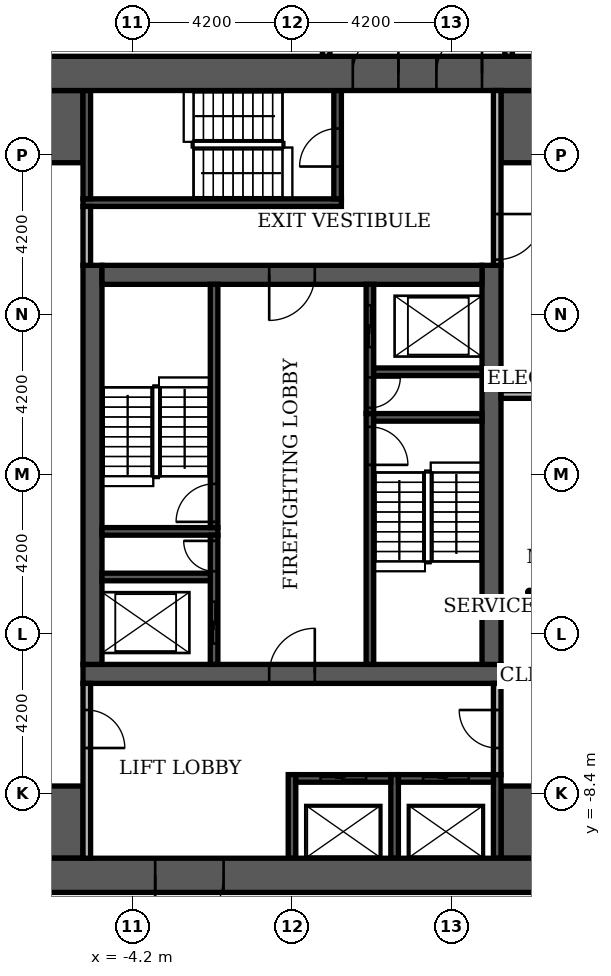
"""IFC4 building model, lengths in metres.
Left out: names, types, materials, properties, quantities, classifications, styles, units other than length and angle.
Written with IfcOpenShell. Run it as: python <this file> out.ifc"""

import sys

from ifc_helpers import new_model, si_unit, direction, frame, frame_2d, origin, place, context, subcontext, project, spatial, rectangle, extrude, element, fill, save


model = new_model("IFC4")
c1 = context("Model", 3, precision=1e-05, world=origin(), true_north=direction((0.0, 1.0)))
c2 = subcontext(c1, "Body", "Model", "MODEL_VIEW")
j1 = project(units=[si_unit("LENGTHUNIT", "METRE"), si_unit("PLANEANGLEUNIT", "RADIAN")], contexts=[c1])
p1 = place(None, origin())
s1 = spatial("IfcSite", under=j1, at=p1, CompositionType="ELEMENT")
p2 = place(p1, origin())
s2 = spatial("IfcBuilding", under=s1, at=p2, CompositionType="ELEMENT")
p3 = place(p2, origin())
s3 = spatial("IfcBuildingStorey", under=s2, at=p3, CompositionType="ELEMENT", Elevation=0.0)
p4 = place(p3, frame((-5.5, -5.25, 0.0), z_axis=(0.0, 0.0, 1.0), x_axis=(1.0, 0.0, 0.0)))
e1 = element("IfcWall", 1, at=p4, inside=s3, PredefinedType="SHEAR", context=c2, shape_type="SweptSolid", body=[
    extrude(rectangle(XDim=11.0, YDim=0.5, at=frame_2d((5.5, 0.0))), origin(), (0.0, 0.0, 1.0), 6.78),
])
p5 = place(p4, frame((4.9, 0.0, 0.0)))
e2 = element("IfcOpeningElement", 2, at=p5, cuts=e1, PredefinedType="OPENING", context=c2, shape_type="SweptSolid", body=[
    extrude(rectangle(XDim=1.2, YDim=2.1, at=frame_2d((0.6, 1.05))), frame((0.0, 0.26, 0.0), z_axis=(0.0, -1.0, 0.0), x_axis=(1.0, 0.0, 0.0)), (0.0, 0.0, 1.0), 0.52),
])
for number, where, z_axis, x_axis in (
    (3, (-5.25, -5.0, 0.0), (0.0, 0.0, 1.0), (0.0, 1.0, 0.0)),
    (4, (5.25, -5.0, 0.0), (0.0, 0.0, 1.0), (0.0, 1.0, 0.0)),
):
    element("IfcWall", number, at=place(p3, frame(where, z_axis=z_axis, x_axis=x_axis)), inside=s3, PredefinedType="SHEAR", context=c2, shape_type="SweptSolid", body=[
        extrude(rectangle(XDim=10.5, YDim=0.5, at=frame_2d((5.25, 0.0))), origin(), (0.0, 0.0, 1.0), 6.78),
    ])
p6 = place(p3, frame((-5.0, 5.25, 0.0), z_axis=(0.0, 0.0, 1.0), x_axis=(1.0, 0.0, 0.0)))
e5 = element("IfcWall", 5, at=p6, inside=s3, PredefinedType="SHEAR", context=c2, shape_type="SweptSolid", body=[
    extrude(rectangle(XDim=10.0, YDim=0.5, at=frame_2d((5.0, 0.0))), origin(), (0.0, 0.0, 1.0), 6.78),
])
p7 = place(p6, frame((4.4, 0.0, 0.0)))
e6 = element("IfcOpeningElement", 6, at=p7, cuts=e5, PredefinedType="OPENING", context=c2, shape_type="SweptSolid", body=[
    extrude(rectangle(XDim=1.2, YDim=2.1, at=frame_2d((0.6, 1.05))), frame((0.0, 0.26, 0.0), z_axis=(0.0, -1.0, 0.0), x_axis=(1.0, 0.0, 0.0)), (0.0, 0.0, 1.0), 0.52),
])
for number, where, z_axis, x_axis in (
    (7, (-10.1, -9.15, 0.0), (0.0, 0.0, 1.0), (1.0, 0.0, 0.0)),
    (8, (5.5, -9.15, 0.0), (0.0, 0.0, 1.0), (1.0, 0.0, 0.0)),
    (9, (-10.1, 9.15, 0.0), (0.0, 0.0, 1.0), (1.0, 0.0, 0.0)),
    (10, (5.5, 9.15, 0.0), (0.0, 0.0, 1.0), (1.0, 0.0, 0.0)),
):
    element("IfcWall", number, at=place(p3, frame(where, z_axis=z_axis, x_axis=x_axis)), inside=s3, PredefinedType="SHEAR", context=c2, shape_type="SweptSolid", body=[
        extrude(rectangle(XDim=4.6, YDim=1.9, at=frame_2d((2.3, 0.0))), origin(), (0.0, 0.0, 1.0), 6.78),
    ])
p8 = place(p3, frame((2.05, -5.0, 0.0), z_axis=(0.0, 0.0, 1.0), x_axis=(0.0, 1.0, 0.0)))
e11 = element("IfcWall", 11, at=p8, inside=s3, PredefinedType="SHEAR", context=c2, shape_type="SweptSolid", body=[
    extrude(rectangle(XDim=6.6, YDim=0.2, at=frame_2d((3.3, 0.0))), origin(), (0.0, 0.0, 1.0), 6.78),
])
p9 = place(p8, frame((5.25, 0.0, 0.0)))
e12 = element("IfcOpeningElement", 12, at=p9, cuts=e11, PredefinedType="OPENING", context=c2, shape_type="SweptSolid", body=[
    extrude(rectangle(XDim=1.0, YDim=2.1, at=frame_2d((0.5, 1.05))), frame((0.0, 0.11, 0.0), z_axis=(0.0, -1.0, 0.0), x_axis=(1.0, 0.0, 0.0)), (0.0, 0.0, 1.0), 0.22),
])
p10 = place(p3, frame((-5.0, -1.5, 0.0), z_axis=(0.0, 0.0, 1.0), x_axis=(1.0, 0.0, 0.0)))
e13 = element("IfcWall", 13, at=p10, inside=s3, PredefinedType="SHEAR", context=c2, shape_type="SweptSolid", body=[
    extrude(rectangle(XDim=3.05, YDim=0.2, at=frame_2d((1.525, 0.0))), origin(), (0.0, 0.0, 1.0), 6.78),
])
p11 = place(p3, frame((-2.05, -1.4, 0.0), z_axis=(0.0, 0.0, 1.0), x_axis=(0.0, 1.0, 0.0)))
e14 = element("IfcWall", 14, at=p11, inside=s3, PredefinedType="SHEAR", context=c2, shape_type="SweptSolid", body=[
    extrude(rectangle(XDim=6.4, YDim=0.2, at=frame_2d((3.2, 0.0))), origin(), (0.0, 0.0, 1.0), 6.78),
])
p12 = place(p11, frame((0.15, 0.0, 0.0)))
e15 = element("IfcOpeningElement", 15, at=p12, cuts=e14, PredefinedType="OPENING", context=c2, shape_type="SweptSolid", body=[
    extrude(rectangle(XDim=1.0, YDim=2.1, at=frame_2d((0.5, 1.05))), frame((0.0, 0.11, 0.0), z_axis=(0.0, -1.0, 0.0), x_axis=(1.0, 0.0, 0.0)), (0.0, 0.0, 1.0), 0.22),
])
p13 = place(p3, frame((2.15, 1.5, 0.0), z_axis=(0.0, 0.0, 1.0), x_axis=(1.0, 0.0, 0.0)))
e16 = element("IfcWall", 16, at=p13, inside=s3, PredefinedType="SHEAR", context=c2, shape_type="SweptSolid", body=[
    extrude(rectangle(XDim=2.85, YDim=0.2, at=frame_2d((1.425, 0.0))), origin(), (0.0, 0.0, 1.0), 6.78),
])
p14 = place(p3, frame((-5.5, 7.15, 0.0), z_axis=(0.0, 0.0, 1.0), x_axis=(1.0, 0.0, 0.0)))
e17 = element("IfcWall", 17, at=p14, inside=s3, PredefinedType="SHEAR", context=c2, shape_type="SweptSolid", body=[
    extrude(rectangle(XDim=6.8, YDim=0.2, at=frame_2d((3.4, 0.0))), origin(), (0.0, 0.0, 1.0), 6.78),
])
p15 = place(p3, frame((-5.4, 7.25, 0.0), z_axis=(0.0, 0.0, 1.0), x_axis=(0.0, 1.0, 0.0)))
e18 = element("IfcWall", 18, at=p15, inside=s3, PredefinedType="SHEAR", context=c2, shape_type="SweptSolid", body=[
    extrude(rectangle(XDim=2.85, YDim=0.2, at=frame_2d((1.425, 0.0))), origin(), (0.0, 0.0, 1.0), 6.78),
])
p16 = place(p3, frame((1.2, 7.25, 0.0), z_axis=(0.0, 0.0, 1.0), x_axis=(0.0, 1.0, 0.0)))
e19 = element("IfcWall", 19, at=p16, inside=s3, PredefinedType="SHEAR", context=c2, shape_type="SweptSolid", body=[
    extrude(rectangle(XDim=2.85, YDim=0.2, at=frame_2d((1.425, 0.0))), origin(), (0.0, 0.0, 1.0), 6.78),
])
p17 = place(p16, frame((0.85, 0.0, 0.0)))
e20 = element("IfcOpeningElement", 20, at=p17, cuts=e19, PredefinedType="OPENING", context=c2, shape_type="SweptSolid", body=[
    extrude(rectangle(XDim=1.0, YDim=2.1, at=frame_2d((0.5, 1.05))), frame((0.0, 0.11, 0.0), z_axis=(0.0, -1.0, 0.0), x_axis=(1.0, 0.0, 0.0)), (0.0, 0.0, 1.0), 0.22),
])
for number, where, z_axis, x_axis in (
    (21, (0.0, -10.1, 0.0), (0.0, 0.0, 1.0), (0.0, 1.0, 0.0)),
    (22, (2.7, -10.1, 0.0), (0.0, 0.0, 1.0), (0.0, 1.0, 0.0)),
    (23, (5.4, -10.1, 0.0), (0.0, 0.0, 1.0), (0.0, 1.0, 0.0)),
):
    element("IfcWall", number, at=place(p3, frame(where, z_axis=z_axis, x_axis=x_axis)), inside=s3, PredefinedType="SHEAR", context=c2, shape_type="SweptSolid", body=[
        extrude(rectangle(XDim=2.2, YDim=0.2, at=frame_2d((1.1, 0.0))), origin(), (0.0, 0.0, 1.0), 6.78),
    ])
p18 = place(p3, frame((0.1, -8.0, 0.0), z_axis=(0.0, 0.0, 1.0), x_axis=(1.0, 0.0, 0.0)))
e24 = element("IfcWall", 24, at=p18, inside=s3, PredefinedType="SHEAR", context=c2, shape_type="SweptSolid", body=[
    extrude(rectangle(XDim=2.5, YDim=0.2, at=frame_2d((1.25, 0.0))), origin(), (0.0, 0.0, 1.0), 6.78),
])
p19 = place(p18, frame((0.65, 0.0, 0.0)))
e25 = element("IfcOpeningElement", 25, at=p19, cuts=e24, PredefinedType="OPENING", context=c2, shape_type="SweptSolid", body=[
    extrude(rectangle(XDim=1.2, YDim=2.1, at=frame_2d((0.6, 1.05))), frame((0.0, 0.11, 0.0), z_axis=(0.0, -1.0, 0.0), x_axis=(1.0, 0.0, 0.0)), (0.0, 0.0, 1.0), 0.22),
])
p20 = place(p3, frame((2.8, -8.0, 0.0), z_axis=(0.0, 0.0, 1.0), x_axis=(1.0, 0.0, 0.0)))
e26 = element("IfcWall", 26, at=p20, inside=s3, PredefinedType="SHEAR", context=c2, shape_type="SweptSolid", body=[
    extrude(rectangle(XDim=2.5, YDim=0.2, at=frame_2d((1.25, 0.0))), origin(), (0.0, 0.0, 1.0), 6.78),
])
p21 = place(p20, frame((0.65, 0.0, 0.0)))
e27 = element("IfcOpeningElement", 27, at=p21, cuts=e26, PredefinedType="OPENING", context=c2, shape_type="SweptSolid", body=[
    extrude(rectangle(XDim=1.2, YDim=2.1, at=frame_2d((0.6, 1.05))), frame((0.0, 0.11, 0.0), z_axis=(0.0, -1.0, 0.0), x_axis=(1.0, 0.0, 0.0)), (0.0, 0.0, 1.0), 0.22),
])
p22 = place(p3, frame((-2.05, -5.0, 0.0), z_axis=(0.0, 0.0, 1.0), x_axis=(0.0, 1.0, 0.0)))
e28 = element("IfcWall", 28, at=p22, inside=s3, PredefinedType="SHEAR", context=c2, shape_type="SweptSolid", body=[
    extrude(rectangle(XDim=3.4, YDim=0.2, at=frame_2d((1.7, 0.0))), origin(), (0.0, 0.0, 1.0), 6.78),
])
p23 = place(p22, frame((0.55, 0.0, 0.0)))
e29 = element("IfcOpeningElement", 29, at=p23, cuts=e28, PredefinedType="OPENING", context=c2, shape_type="SweptSolid", body=[
    extrude(rectangle(XDim=1.1, YDim=2.1, at=frame_2d((0.55, 1.05))), frame((0.0, 0.11, 0.0), z_axis=(0.0, -1.0, 0.0), x_axis=(1.0, 0.0, 0.0)), (0.0, 0.0, 1.0), 0.22),
])
p24 = place(p22, frame((2.45, 0.0, 0.0)))
e30 = element("IfcOpeningElement", 30, at=p24, cuts=e28, PredefinedType="OPENING", context=c2, shape_type="SweptSolid", body=[
    extrude(rectangle(XDim=0.8, YDim=2.1, at=frame_2d((0.4, 1.05))), frame((0.0, 0.11, 0.0), z_axis=(0.0, -1.0, 0.0), x_axis=(1.0, 0.0, 0.0)), (0.0, 0.0, 1.0), 0.22),
])
p25 = place(p3, frame((-5.0, -2.7, 0.0), z_axis=(0.0, 0.0, 1.0), x_axis=(1.0, 0.0, 0.0)))
e31 = element("IfcWall", 31, at=p25, inside=s3, PredefinedType="SHEAR", context=c2, shape_type="SweptSolid", body=[
    extrude(rectangle(XDim=2.85, YDim=0.2, at=frame_2d((1.425, 0.0))), origin(), (0.0, 0.0, 1.0), 6.78),
])
p26 = place(p3, frame((2.05, 1.6, 0.0), z_axis=(0.0, 0.0, 1.0), x_axis=(0.0, 1.0, 0.0)))
e32 = element("IfcWall", 32, at=p26, inside=s3, PredefinedType="SHEAR", context=c2, shape_type="SweptSolid", body=[
    extrude(rectangle(XDim=3.4, YDim=0.2, at=frame_2d((1.7, 0.0))), origin(), (0.0, 0.0, 1.0), 6.78),
])
p27 = place(p26, frame((1.75, 0.0, 0.0)))
e33 = element("IfcOpeningElement", 33, at=p27, cuts=e32, PredefinedType="OPENING", context=c2, shape_type="SweptSolid", body=[
    extrude(rectangle(XDim=1.1, YDim=2.1, at=frame_2d((0.55, 1.05))), frame((0.0, 0.11, 0.0), z_axis=(0.0, -1.0, 0.0), x_axis=(1.0, 0.0, 0.0)), (0.0, 0.0, 1.0), 0.22),
])
p28 = place(p26, frame((0.15, 0.0, 0.0)))
e34 = element("IfcOpeningElement", 34, at=p28, cuts=e32, PredefinedType="OPENING", context=c2, shape_type="SweptSolid", body=[
    extrude(rectangle(XDim=0.8, YDim=2.1, at=frame_2d((0.4, 1.05))), frame((0.0, 0.11, 0.0), z_axis=(0.0, -1.0, 0.0), x_axis=(1.0, 0.0, 0.0)), (0.0, 0.0, 1.0), 0.22),
])
p29 = place(p3, frame((2.15, 2.7, 0.0), z_axis=(0.0, 0.0, 1.0), x_axis=(1.0, 0.0, 0.0)))
e35 = element("IfcWall", 35, at=p29, inside=s3, PredefinedType="SHEAR", context=c2, shape_type="SweptSolid", body=[
    extrude(rectangle(XDim=2.85, YDim=0.2, at=frame_2d((1.425, 0.0))), origin(), (0.0, 0.0, 1.0), 6.78),
])
p30 = place(p3, frame((-11.0, -10.55, 0.0), z_axis=(0.0, 0.0, 1.0), x_axis=(1.0, 0.0, 0.0)))
e36 = element("IfcWall", 36, at=p30, inside=s3, PredefinedType="SHEAR", context=c2, shape_type="SweptSolid", body=[
    extrude(rectangle(XDim=22.0, YDim=0.9, at=frame_2d((11.0, 0.0))), origin(), (0.0, 0.0, 1.0), 6.78),
])
p31 = place(p30, frame((7.4, 0.0, 0.0)))
e37 = element("IfcOpeningElement", 37, at=p31, cuts=e36, PredefinedType="OPENING", context=c2, shape_type="SweptSolid", body=[
    extrude(rectangle(XDim=1.8, YDim=2.2, at=frame_2d((0.9, 1.1))), frame((0.0, 0.46, 0.0), z_axis=(0.0, -1.0, 0.0), x_axis=(1.0, 0.0, 0.0)), (0.0, 0.0, 1.0), 0.92),
])
p32 = place(p3, frame((-11.0, 10.55, 0.0), z_axis=(0.0, 0.0, 1.0), x_axis=(1.0, 0.0, 0.0)))
e38 = element("IfcWall", 38, at=p32, inside=s3, PredefinedType="SHEAR", context=c2, shape_type="SweptSolid", body=[
    extrude(rectangle(XDim=22.0, YDim=0.9, at=frame_2d((11.0, 0.0))), origin(), (0.0, 0.0, 1.0), 6.78),
])
p33 = place(p32, frame((12.6, 0.0, 0.0)))
e39 = element("IfcOpeningElement", 39, at=p33, cuts=e38, PredefinedType="OPENING", context=c2, shape_type="SweptSolid", body=[
    extrude(rectangle(XDim=1.2, YDim=2.2, at=frame_2d((0.6, 1.1))), frame((0.0, 0.46, 0.0), z_axis=(0.0, -1.0, 0.0), x_axis=(1.0, 0.0, 0.0)), (0.0, 0.0, 1.0), 0.92),
])
p34 = place(p32, frame((14.8, 0.0, 0.0)))
e40 = element("IfcOpeningElement", 40, at=p34, cuts=e38, PredefinedType="OPENING", context=c2, shape_type="SweptSolid", body=[
    extrude(rectangle(XDim=1.2, YDim=2.2, at=frame_2d((0.6, 1.1))), frame((0.0, 0.46, 0.0), z_axis=(0.0, -1.0, 0.0), x_axis=(1.0, 0.0, 0.0)), (0.0, 0.0, 1.0), 0.92),
])
p35 = place(p3, frame((-5.4, -10.1, 0.0), z_axis=(0.0, 0.0, 1.0), x_axis=(0.0, 1.0, 0.0)))
e41 = element("IfcWall", 41, at=p35, inside=s3, PredefinedType="PARTITIONING", context=c2, shape_type="SweptSolid", body=[
    extrude(rectangle(XDim=4.6, YDim=0.2, at=frame_2d((2.3, 0.0))), origin(), (0.0, 0.0, 1.0), 6.78),
])
p36 = place(p35, frame((2.9, 0.0, 0.0)))
e42 = element("IfcOpeningElement", 42, at=p36, cuts=e41, PredefinedType="OPENING", context=c2, shape_type="SweptSolid", body=[
    extrude(rectangle(XDim=1.0, YDim=2.1, at=frame_2d((0.5, 1.05))), frame((0.0, 0.11, 0.0), z_axis=(0.0, -1.0, 0.0), x_axis=(1.0, 0.0, 0.0)), (0.0, 0.0, 1.0), 0.22),
])
p37 = place(p3, frame((5.4, -7.9, 0.0), z_axis=(0.0, 0.0, 1.0), x_axis=(0.0, 1.0, 0.0)))
e43 = element("IfcWall", 43, at=p37, inside=s3, PredefinedType="PARTITIONING", context=c2, shape_type="SweptSolid", body=[
    extrude(rectangle(XDim=2.4, YDim=0.2, at=frame_2d((1.2, 0.0))), origin(), (0.0, 0.0, 1.0), 6.78),
])
p38 = place(p37, frame((0.7, 0.0, 0.0)))
e44 = element("IfcOpeningElement", 44, at=p38, cuts=e43, PredefinedType="OPENING", context=c2, shape_type="SweptSolid", body=[
    extrude(rectangle(XDim=1.0, YDim=2.1, at=frame_2d((0.5, 1.05))), frame((0.0, 0.11, 0.0), z_axis=(0.0, -1.0, 0.0), x_axis=(1.0, 0.0, 0.0)), (0.0, 0.0, 1.0), 0.22),
])
p39 = place(p3, frame((5.5, 2.1, 0.0), z_axis=(0.0, 0.0, 1.0), x_axis=(1.0, 0.0, 0.0)))
e45 = element("IfcWall", 45, at=p39, inside=s3, PredefinedType="PARTITIONING", context=c2, shape_type="SweptSolid", body=[
    extrude(rectangle(XDim=1.5, YDim=0.2, at=frame_2d((0.75, 0.0))), origin(), (0.0, 0.0, 1.0), 6.78),
])
p40 = place(p3, frame((-5.4, 5.5, 0.0), z_axis=(0.0, 0.0, 1.0), x_axis=(0.0, 1.0, 0.0)))
e46 = element("IfcWall", 46, at=p40, inside=s3, PredefinedType="PARTITIONING", context=c2, shape_type="SweptSolid", body=[
    extrude(rectangle(XDim=1.55, YDim=0.2, at=frame_2d((0.775, 0.0))), origin(), (0.0, 0.0, 1.0), 6.78),
])
p41 = place(p3, frame((5.4, 5.5, 0.0), z_axis=(0.0, 0.0, 1.0), x_axis=(0.0, 1.0, 0.0)))
e47 = element("IfcWall", 47, at=p41, inside=s3, PredefinedType="PARTITIONING", context=c2, shape_type="SweptSolid", body=[
    extrude(rectangle(XDim=4.6, YDim=0.2, at=frame_2d((2.3, 0.0))), origin(), (0.0, 0.0, 1.0), 6.78),
])
p42 = place(p41, frame((0.15, 0.0, 0.0)))
e48 = element("IfcOpeningElement", 48, at=p42, cuts=e47, PredefinedType="OPENING", context=c2, shape_type="SweptSolid", body=[
    extrude(rectangle(XDim=1.2, YDim=2.1, at=frame_2d((0.6, 1.05))), frame((0.0, 0.11, 0.0), z_axis=(0.0, -1.0, 0.0), x_axis=(1.0, 0.0, 0.0)), (0.0, 0.0, 1.0), 0.22),
])
for number, where, z_axis, x_axis in (
    (49, (0.9, 11.0, 0.0), (0.0, 0.0, 1.0), (0.0, 1.0, 0.0)),
    (50, (5.7, 11.0, 0.0), (0.0, 0.0, 1.0), (0.0, 1.0, 0.0)),
):
    element("IfcWall", number, at=place(p3, frame(where, z_axis=z_axis, x_axis=x_axis)), inside=s3, PredefinedType="PARTITIONING", context=c2, shape_type="SweptSolid", body=[
        extrude(rectangle(XDim=35.55, YDim=0.2, at=frame_2d((17.775, 0.0))), origin(), (0.0, 0.0, 1.0), 6.48),
    ])
p43 = place(p19, origin())
e51 = element("IfcDoor", 51, at=p43, inside=s3, OperationType="SLIDING_TO_LEFT", PredefinedType="DOOR", context=c2, shape_type="SweptSolid", body=[
    extrude(rectangle(XDim=1.2, YDim=2.1, at=frame_2d((0.6, 1.05))), frame((0.0, 0.025, 0.0), z_axis=(0.0, -1.0, 0.0), x_axis=(1.0, 0.0, 0.0)), (0.0, 0.0, 1.0), 0.05),
])
fill(e25, e51)
p44 = place(p21, origin())
e52 = element("IfcDoor", 52, at=p44, inside=s3, OperationType="SLIDING_TO_LEFT", PredefinedType="DOOR", context=c2, shape_type="SweptSolid", body=[
    extrude(rectangle(XDim=1.2, YDim=2.1, at=frame_2d((0.6, 1.05))), frame((0.0, 0.025, 0.0), z_axis=(0.0, -1.0, 0.0), x_axis=(1.0, 0.0, 0.0)), (0.0, 0.0, 1.0), 0.05),
])
fill(e27, e52)
p45 = place(p27, origin())
e53 = element("IfcDoor", 53, at=p45, inside=s3, OperationType="SLIDING_TO_LEFT", PredefinedType="DOOR", context=c2, shape_type="SweptSolid", body=[
    extrude(rectangle(XDim=1.1, YDim=2.1, at=frame_2d((0.55, 1.05))), frame((0.0, 0.025, 0.0), z_axis=(0.0, -1.0, 0.0), x_axis=(1.0, 0.0, 0.0)), (0.0, 0.0, 1.0), 0.05),
])
fill(e33, e53)
p46 = place(p23, origin())
e54 = element("IfcDoor", 54, at=p46, inside=s3, OperationType="SLIDING_TO_LEFT", PredefinedType="DOOR", context=c2, shape_type="SweptSolid", body=[
    extrude(rectangle(XDim=1.1, YDim=2.1, at=frame_2d((0.55, 1.05))), frame((0.0, 0.025, 0.0), z_axis=(0.0, -1.0, 0.0), x_axis=(1.0, 0.0, 0.0)), (0.0, 0.0, 1.0), 0.05),
])
fill(e29, e54)
p47 = place(p12, origin())
e55 = element("IfcDoor", 55, at=p47, inside=s3, OperationType="SINGLE_SWING_LEFT", PredefinedType="DOOR", context=c2, shape_type="SweptSolid", body=[
    extrude(rectangle(XDim=1.0, YDim=2.1, at=frame_2d((0.5, 1.05))), frame((0.0, 0.025, 0.0), z_axis=(0.0, -1.0, 0.0), x_axis=(1.0, 0.0, 0.0)), (0.0, 0.0, 1.0), 0.05),
])
fill(e15, e55)
p48 = place(p9, frame((1.0, 0.0, 0.0), z_axis=(0.0, 0.0, 1.0), x_axis=(-1.0, 0.0, 0.0)))
e56 = element("IfcDoor", 56, at=p48, inside=s3, OperationType="SINGLE_SWING_LEFT", PredefinedType="DOOR", context=c2, shape_type="SweptSolid", body=[
    extrude(rectangle(XDim=1.0, YDim=2.1, at=frame_2d((0.5, 1.05))), frame((0.0, 0.025, 0.0), z_axis=(0.0, -1.0, 0.0), x_axis=(1.0, 0.0, 0.0)), (0.0, 0.0, 1.0), 0.05),
])
fill(e12, e56)
p49 = place(p28, frame((0.8, 0.0, 0.0), z_axis=(0.0, 0.0, 1.0), x_axis=(-1.0, 0.0, 0.0)))
e57 = element("IfcDoor", 57, at=p49, inside=s3, OperationType="SINGLE_SWING_RIGHT", PredefinedType="DOOR", context=c2, shape_type="SweptSolid", body=[
    extrude(rectangle(XDim=0.8, YDim=2.1, at=frame_2d((0.4, 1.05))), frame((0.0, 0.025, 0.0), z_axis=(0.0, -1.0, 0.0), x_axis=(1.0, 0.0, 0.0)), (0.0, 0.0, 1.0), 0.05),
])
fill(e34, e57)
p50 = place(p24, origin())
e58 = element("IfcDoor", 58, at=p50, inside=s3, OperationType="SINGLE_SWING_RIGHT", PredefinedType="DOOR", context=c2, shape_type="SweptSolid", body=[
    extrude(rectangle(XDim=0.8, YDim=2.1, at=frame_2d((0.4, 1.05))), frame((0.0, 0.025, 0.0), z_axis=(0.0, -1.0, 0.0), x_axis=(1.0, 0.0, 0.0)), (0.0, 0.0, 1.0), 0.05),
])
fill(e30, e58)
p51 = place(p7, frame((1.2, 0.0, 0.0), z_axis=(0.0, 0.0, 1.0), x_axis=(-1.0, 0.0, 0.0)))
e59 = element("IfcDoor", 59, at=p51, inside=s3, OperationType="SINGLE_SWING_LEFT", PredefinedType="DOOR", context=c2, shape_type="SweptSolid", body=[
    extrude(rectangle(XDim=1.2, YDim=2.1, at=frame_2d((0.6, 1.05))), frame((0.0, 0.025, 0.0), z_axis=(0.0, -1.0, 0.0), x_axis=(1.0, 0.0, 0.0)), (0.0, 0.0, 1.0), 0.05),
])
fill(e6, e59)
p52 = place(p5, origin())
e60 = element("IfcDoor", 60, at=p52, inside=s3, OperationType="SINGLE_SWING_RIGHT", PredefinedType="DOOR", context=c2, shape_type="SweptSolid", body=[
    extrude(rectangle(XDim=1.2, YDim=2.1, at=frame_2d((0.6, 1.05))), frame((0.0, 0.025, 0.0), z_axis=(0.0, -1.0, 0.0), x_axis=(1.0, 0.0, 0.0)), (0.0, 0.0, 1.0), 0.05),
])
fill(e2, e60)
p53 = place(p17, origin())
e61 = element("IfcDoor", 61, at=p53, inside=s3, OperationType="SINGLE_SWING_LEFT", PredefinedType="DOOR", context=c2, shape_type="SweptSolid", body=[
    extrude(rectangle(XDim=1.0, YDim=2.1, at=frame_2d((0.5, 1.05))), frame((0.0, 0.025, 0.0), z_axis=(0.0, -1.0, 0.0), x_axis=(1.0, 0.0, 0.0)), (0.0, 0.0, 1.0), 0.05),
])
fill(e20, e61)
p54 = place(p36, frame((1.0, 0.0, 0.0), z_axis=(0.0, 0.0, 1.0), x_axis=(-1.0, 0.0, 0.0)))
e62 = element("IfcDoor", 62, at=p54, inside=s3, OperationType="SINGLE_SWING_LEFT", PredefinedType="DOOR", context=c2, shape_type="SweptSolid", body=[
    extrude(rectangle(XDim=1.0, YDim=2.1, at=frame_2d((0.5, 1.05))), frame((0.0, 0.025, 0.0), z_axis=(0.0, -1.0, 0.0), x_axis=(1.0, 0.0, 0.0)), (0.0, 0.0, 1.0), 0.05),
])
fill(e42, e62)
p55 = place(p38, origin())
e63 = element("IfcDoor", 63, at=p55, inside=s3, OperationType="SINGLE_SWING_RIGHT", PredefinedType="DOOR", context=c2, shape_type="SweptSolid", body=[
    extrude(rectangle(XDim=1.0, YDim=2.1, at=frame_2d((0.5, 1.05))), frame((0.0, 0.025, 0.0), z_axis=(0.0, -1.0, 0.0), x_axis=(1.0, 0.0, 0.0)), (0.0, 0.0, 1.0), 0.05),
])
fill(e44, e63)
p56 = place(p33, origin())
e64 = element("IfcDoor", 64, at=p56, inside=s3, OperationType="SINGLE_SWING_RIGHT", PredefinedType="DOOR", context=c2, shape_type="SweptSolid", body=[
    extrude(rectangle(XDim=1.2, YDim=2.2, at=frame_2d((0.6, 1.1))), frame((0.0, 0.025, 0.0), z_axis=(0.0, -1.0, 0.0), x_axis=(1.0, 0.0, 0.0)), (0.0, 0.0, 1.0), 0.05),
])
fill(e39, e64)
p57 = place(p34, origin())
e65 = element("IfcDoor", 65, at=p57, inside=s3, OperationType="SINGLE_SWING_RIGHT", PredefinedType="DOOR", context=c2, shape_type="SweptSolid", body=[
    extrude(rectangle(XDim=1.2, YDim=2.2, at=frame_2d((0.6, 1.1))), frame((0.0, 0.025, 0.0), z_axis=(0.0, -1.0, 0.0), x_axis=(1.0, 0.0, 0.0)), (0.0, 0.0, 1.0), 0.05),
])
fill(e40, e65)
p58 = place(p31, frame((1.8, 0.0, 0.0), z_axis=(0.0, 0.0, 1.0), x_axis=(-1.0, 0.0, 0.0)))
e66 = element("IfcDoor", 66, at=p58, inside=s3, OperationType="DOUBLE_DOOR_SINGLE_SWING", PredefinedType="DOOR", context=c2, shape_type="SweptSolid", body=[
    extrude(rectangle(XDim=1.8, YDim=2.2, at=frame_2d((0.9, 1.1))), frame((0.0, 0.025, 0.0), z_axis=(0.0, -1.0, 0.0), x_axis=(1.0, 0.0, 0.0)), (0.0, 0.0, 1.0), 0.05),
])
fill(e37, e66)
p59 = place(p42, frame((1.2, 0.0, 0.0), z_axis=(0.0, 0.0, 1.0), x_axis=(-1.0, 0.0, 0.0)))
e67 = element("IfcDoor", 67, at=p59, inside=s3, OperationType="SINGLE_SWING_RIGHT", PredefinedType="DOOR", context=c2, shape_type="SweptSolid", body=[
    extrude(rectangle(XDim=1.2, YDim=2.1, at=frame_2d((0.6, 1.05))), frame((0.0, 0.025, 0.0), z_axis=(0.0, -1.0, 0.0), x_axis=(1.0, 0.0, 0.0)), (0.0, 0.0, 1.0), 0.05),
])
fill(e48, e67)
save(model, sys.argv[1])
